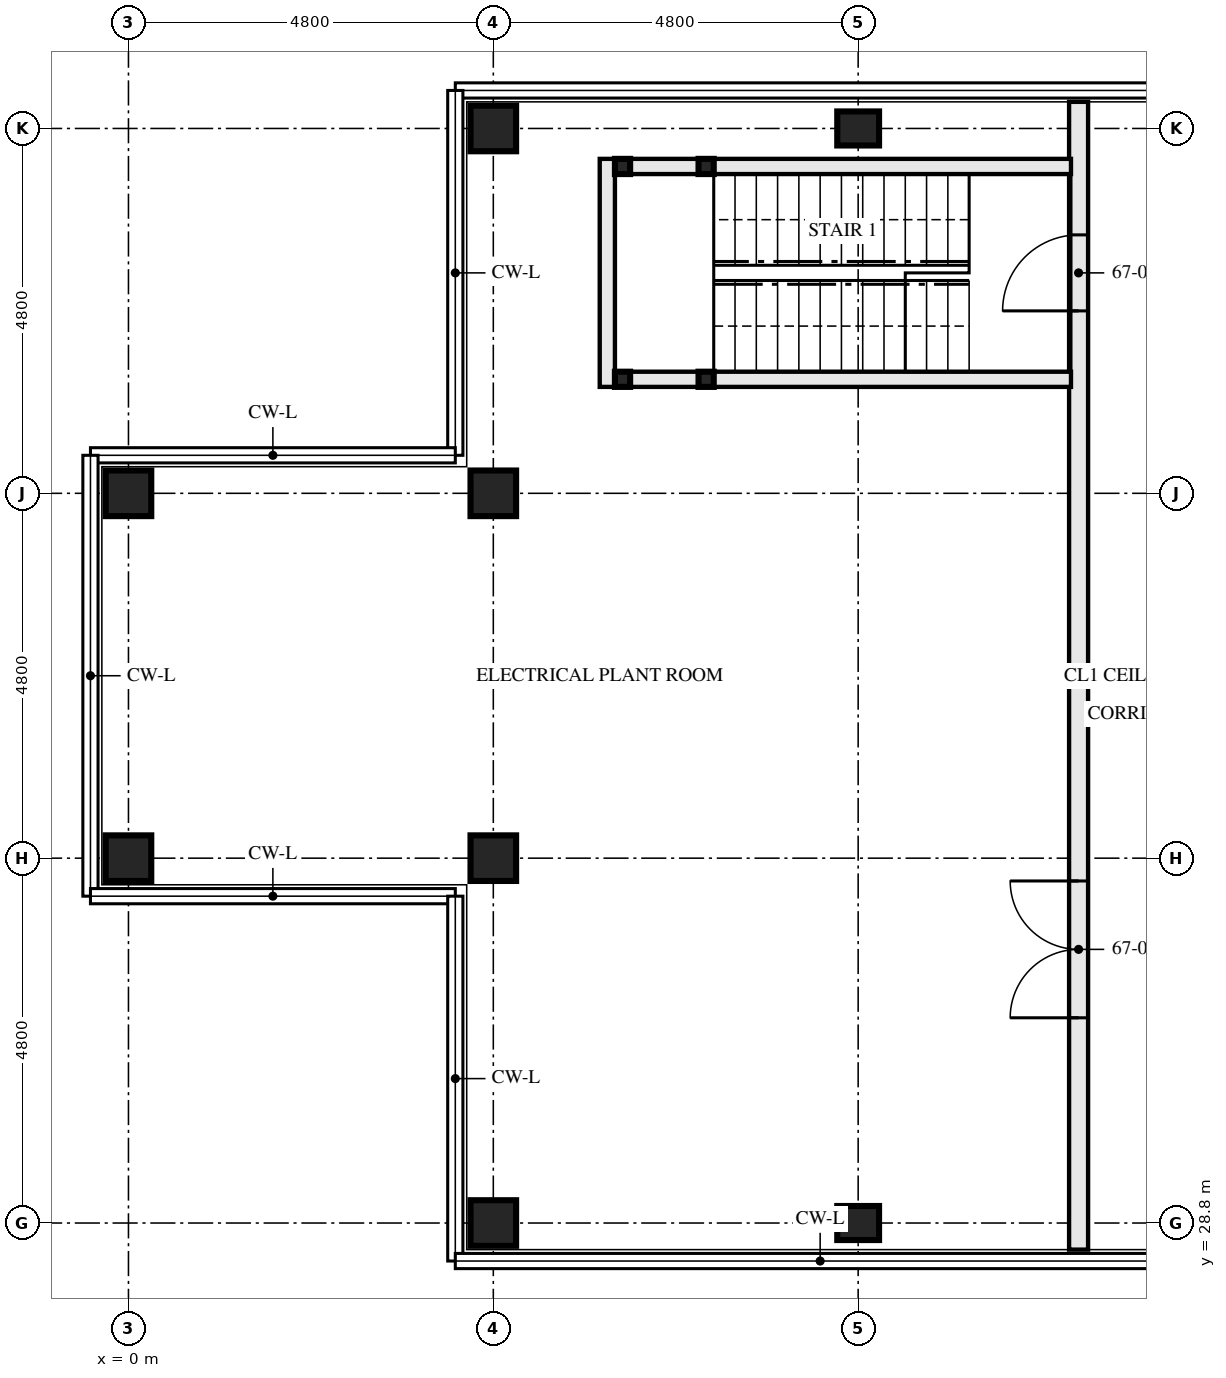
"""IFC4 building model, lengths in metres.
Left out: names, types, materials, properties, quantities, classifications, styles, units other than length and angle.
Written with IfcOpenShell. Run it as: python <this file> out.ifc"""

import sys

from ifc_helpers import new_model, si_unit, direction, frame, frame_2d, origin, origin_2d, place, context, subcontext, project, spatial, rectangle, hollow_rectangle, i_section, extrude, element, fill, save


model = new_model("IFC4")
c1 = context("Model", 3, precision=1e-05, world=origin(), true_north=direction((0.0, 1.0)))
c2 = subcontext(c1, "Body", "Model", "MODEL_VIEW")
j1 = project(units=[si_unit("LENGTHUNIT", "METRE"), si_unit("PLANEANGLEUNIT", "RADIAN")], contexts=[c1])
p1 = place(None, origin())
s1 = spatial("IfcSite", under=j1, at=p1, CompositionType="ELEMENT")
p2 = place(p1, origin())
s2 = spatial("IfcBuilding", under=s1, at=p2, CompositionType="ELEMENT")
p3 = place(p2, frame((0.0, 0.0, 243.5)))
s3 = spatial("IfcBuildingStorey", under=s2, at=p3, CompositionType="ELEMENT", Elevation=243.5)
for number, where, z_axis, x_axis in (
    (1, (0.0, 33.6, 0.0), (0.0, 0.0, 1.0), (0.0, 1.0, 0.0)),
    (2, (0.0, 38.4, 0.0), (0.0, 0.0, 1.0), (0.0, 1.0, 0.0)),
    (3, (4.8, 28.8, 0.0), (0.0, 0.0, 1.0), (0.0, 1.0, 0.0)),
    (4, (4.8, 33.6, 0.0), (0.0, 0.0, 1.0), (0.0, 1.0, 0.0)),
    (5, (4.8, 38.4, 0.0), (0.0, 0.0, 1.0), (0.0, 1.0, 0.0)),
    (6, (4.8, 43.2, 0.0), (0.0, 0.0, 1.0), (0.0, 1.0, 0.0)),
):
    element("IfcColumn", number, at=place(p3, frame(where, z_axis=z_axis, x_axis=x_axis)), inside=s3, PredefinedType="COLUMN", context=c2, shape_type="SweptSolid", body=[
        extrude(hollow_rectangle(XDim=0.6, YDim=0.6, WallThickness=0.05, at=origin_2d()), origin(), (0.0, 0.0, 1.0), 4.5),
    ])
for number, where, z_axis, x_axis in (
    (7, (9.6, 28.8, 0.0), (0.0, 0.0, 1.0), (0.0, 1.0, 0.0)),
    (8, (9.6, 43.2, 0.0), (0.0, 0.0, 1.0), (0.0, 1.0, 0.0)),
):
    element("IfcColumn", number, at=place(p3, frame(where, z_axis=z_axis, x_axis=x_axis)), inside=s3, PredefinedType="COLUMN", context=c2, shape_type="SweptSolid", body=[
        extrude(i_section(OverallWidth=0.448, OverallDepth=0.55, WebThickness=0.072, FlangeThickness=0.115, FilletRadius=0.015, at=origin_2d()), origin(), (0.0, 0.0, 1.0), 4.5),
    ])
for number, where, z_axis, x_axis in (
    (9, (6.5, 42.7, 0.0), (0.0, 0.0, 1.0), (1.0, 0.0, 0.0)),
    (10, (6.5, 39.9, 0.0), (0.0, 0.0, 1.0), (1.0, 0.0, 0.0)),
    (11, (7.6, 42.7, 0.0), (0.0, 0.0, 1.0), (1.0, 0.0, 0.0)),
    (12, (7.6, 39.9, 0.0), (0.0, 0.0, 1.0), (1.0, 0.0, 0.0)),
):
    element("IfcColumn", number, at=place(p3, frame(where, z_axis=z_axis, x_axis=x_axis)), inside=s3, PredefinedType="COLUMN", context=c2, shape_type="SweptSolid", body=[
        extrude(hollow_rectangle(XDim=0.2, YDim=0.2, WallThickness=0.008, at=origin_2d()), origin(), (0.0, 0.0, 1.0), 4.25),
    ])
p4 = place(p3, frame((6.6, 42.7, 0.0), z_axis=(0.0, 0.0, 1.0), x_axis=(1.0, 0.0, 0.0)))
e13 = element("IfcWall", 13, at=p4, inside=s3, PredefinedType="SOLIDWALL", context=c2, shape_type="SweptSolid", body=[
    extrude(rectangle(XDim=0.9, YDim=0.2, at=frame_2d((0.45, 0.0))), origin(), (0.0, 0.0, 1.0), 4.25),
])
p5 = place(p3, frame((7.7, 42.7, 0.0), z_axis=(0.0, 0.0, 1.0), x_axis=(1.0, 0.0, 0.0)))
e14 = element("IfcWall", 14, at=p5, inside=s3, PredefinedType="SOLIDWALL", context=c2, shape_type="SweptSolid", body=[
    extrude(rectangle(XDim=4.7, YDim=0.2, at=frame_2d((2.35, 0.0))), origin(), (0.0, 0.0, 1.0), 4.25),
])
p6 = place(p3, frame((6.6, 39.9, 0.0), z_axis=(0.0, 0.0, 1.0), x_axis=(1.0, 0.0, 0.0)))
e15 = element("IfcWall", 15, at=p6, inside=s3, PredefinedType="SOLIDWALL", context=c2, shape_type="SweptSolid", body=[
    extrude(rectangle(XDim=0.9, YDim=0.2, at=frame_2d((0.45, 0.0))), origin(), (0.0, 0.0, 1.0), 4.25),
])
p7 = place(p3, frame((7.7, 39.9, 0.0), z_axis=(0.0, 0.0, 1.0), x_axis=(1.0, 0.0, 0.0)))
e16 = element("IfcWall", 16, at=p7, inside=s3, PredefinedType="SOLIDWALL", context=c2, shape_type="SweptSolid", body=[
    extrude(rectangle(XDim=4.7, YDim=0.2, at=frame_2d((2.35, 0.0))), origin(), (0.0, 0.0, 1.0), 4.25),
])
p8 = place(p3, frame((6.3, 42.8, 0.0), z_axis=(0.0, 0.0, 1.0), x_axis=(0.0, -1.0, 0.0)))
e17 = element("IfcWall", 17, at=p8, inside=s3, PredefinedType="SOLIDWALL", context=c2, shape_type="SweptSolid", body=[
    extrude(rectangle(XDim=3.0, YDim=0.2, at=frame_2d((1.5, 0.0))), origin(), (0.0, 0.0, 1.0), 4.25),
])
p9 = place(p3, frame((12.5, 43.55, 0.0), z_axis=(0.0, 0.0, 1.0), x_axis=(0.0, -1.0, 0.0)))
e18 = element("IfcWall", 18, at=p9, inside=s3, PredefinedType="SOLIDWALL", context=c2, shape_type="SweptSolid", body=[
    extrude(rectangle(XDim=15.1, YDim=0.25, at=frame_2d((7.55, 0.0))), origin(), (0.0, 0.0, 1.0), 3.232),
])
p10 = place(p9, frame((1.75, 0.0, 0.0)))
e19 = element("IfcOpeningElement", 19, at=p10, cuts=e18, PredefinedType="OPENING", context=c2, shape_type="SweptSolid", body=[
    extrude(rectangle(XDim=1.0, YDim=2.1, at=frame_2d((0.5, 1.05))), frame((0.0, 0.135, 0.0), z_axis=(0.0, -1.0, 0.0), x_axis=(1.0, 0.0, 0.0)), (0.0, 0.0, 1.0), 0.271),
])
p11 = place(p9, frame((10.25, 0.0, 0.0)))
e20 = element("IfcOpeningElement", 20, at=p11, cuts=e18, PredefinedType="OPENING", context=c2, shape_type="SweptSolid", body=[
    extrude(rectangle(XDim=1.8, YDim=2.4, at=frame_2d((0.9, 1.2))), frame((0.0, 0.135, 0.0), z_axis=(0.0, -1.0, 0.0), x_axis=(1.0, 0.0, 0.0)), (0.0, 0.0, 1.0), 0.271),
])
p12 = place(p10, frame((1.0, 0.0, 0.0), z_axis=(0.0, 0.0, 1.0), x_axis=(-1.0, 0.0, 0.0)))
e21 = element("IfcDoor", 21, at=p12, inside=s3, OperationType="SINGLE_SWING_RIGHT", PredefinedType="DOOR", context=c2, shape_type="SweptSolid", body=[
    extrude(rectangle(XDim=1.0, YDim=2.1, at=frame_2d((0.5, 1.05))), frame((0.0, 0.032, 0.0), z_axis=(0.0, -1.0, 0.0), x_axis=(1.0, 0.0, 0.0)), (0.0, 0.0, 1.0), 0.064),
])
fill(e19, e21)
p13 = place(p11, frame((1.8, 0.0, 0.0), z_axis=(0.0, 0.0, 1.0), x_axis=(-1.0, 0.0, 0.0)))
e22 = element("IfcDoor", 22, at=p13, inside=s3, OperationType="DOUBLE_DOOR_SINGLE_SWING", PredefinedType="DOOR", context=c2, shape_type="SweptSolid", body=[
    extrude(rectangle(XDim=1.8, YDim=2.4, at=frame_2d((0.9, 1.2))), frame((0.0, 0.032, 0.0), z_axis=(0.0, -1.0, 0.0), x_axis=(1.0, 0.0, 0.0)), (0.0, 0.0, 1.0), 0.064),
])
fill(e20, e22)
save(model, sys.argv[1])
